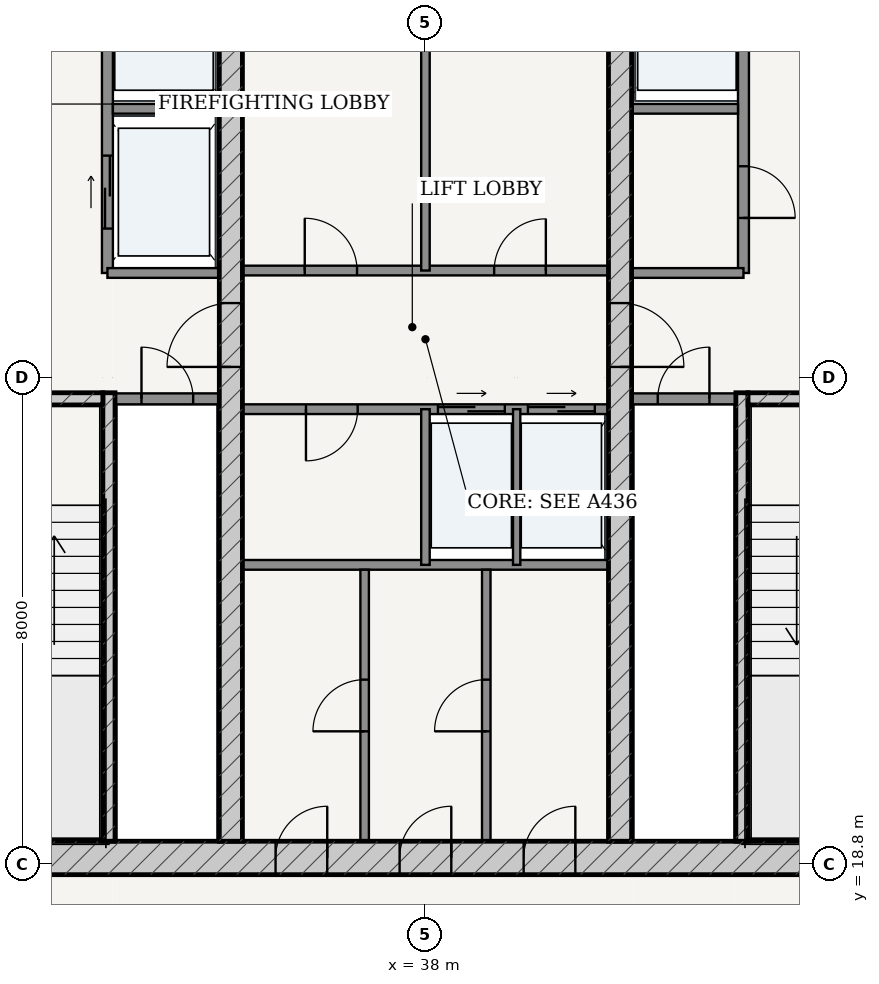
"""IFC4 building model, lengths in metres.
Left out: names, types, materials, properties, quantities, classifications, styles, units other than length and angle.
Written with IfcOpenShell. Run it as: python <this file> out.ifc"""

import sys

from ifc_helpers import new_model, si_unit, direction, frame, frame_2d, origin, place, context, subcontext, project, spatial, rectangle, extrude, source, transform, mapped, element, fill, save


model = new_model("IFC4")
c1 = context("Model", 3, precision=1e-05, world=origin(), true_north=direction((-0.2419218956, 0.970295726276)))
c2 = subcontext(c1, "Body", "Model", "MODEL_VIEW")
j1 = project(units=[si_unit("LENGTHUNIT", "METRE"), si_unit("PLANEANGLEUNIT", "RADIAN")], contexts=[c1])
p1 = place(None, origin())
s1 = spatial("IfcSite", under=j1, at=p1, CompositionType="ELEMENT")
p2 = place(p1, origin())
s2 = spatial("IfcBuilding", under=s1, at=p2, CompositionType="ELEMENT")
p3 = place(p2, frame((0.0, 0.0, 274.45)))
s3 = spatial("IfcBuildingStorey", under=s2, at=p3, CompositionType="ELEMENT", Elevation=274.45)
p4 = place(p3, frame((28.825, 18.9, 0.0), z_axis=(0.0, 0.0, 1.0), x_axis=(1.0, 0.0, 0.0)))
e1 = element("IfcWall", 1, at=p4, inside=s3, PredefinedType="SHEAR", context=c2, shape_type="SweptSolid", body=[
    extrude(rectangle(XDim=18.35, YDim=0.55, at=frame_2d((9.175, 0.0))), origin(), (0.0, 0.0, 1.0), 3.49),
])
p5 = place(p4, frame((6.71, 0.0, 0.0)))
e2 = element("IfcOpeningElement", 2, at=p5, cuts=e1, PredefinedType="OPENING", context=c2, shape_type="SweptSolid", body=[
    extrude(rectangle(XDim=0.85, YDim=2.1, at=frame_2d((0.425, 1.05))), frame((0.0, 0.285, 0.0), z_axis=(0.0, -1.0, 0.0), x_axis=(1.0, 0.0, 0.0)), (0.0, 0.0, 1.0), 0.57),
])
p6 = place(p4, frame((8.75, 0.0, 0.0)))
e3 = element("IfcOpeningElement", 3, at=p6, cuts=e1, PredefinedType="OPENING", context=c2, shape_type="SweptSolid", body=[
    extrude(rectangle(XDim=0.85, YDim=2.1, at=frame_2d((0.425, 1.05))), frame((0.0, 0.285, 0.0), z_axis=(0.0, -1.0, 0.0), x_axis=(1.0, 0.0, 0.0)), (0.0, 0.0, 1.0), 0.57),
])
p7 = place(p4, frame((10.79, 0.0, 0.0)))
e4 = element("IfcOpeningElement", 4, at=p7, cuts=e1, PredefinedType="OPENING", context=c2, shape_type="SweptSolid", body=[
    extrude(rectangle(XDim=0.85, YDim=2.1, at=frame_2d((0.425, 1.05))), frame((0.0, 0.285, 0.0), z_axis=(0.0, -1.0, 0.0), x_axis=(1.0, 0.0, 0.0)), (0.0, 0.0, 1.0), 0.57),
])
p8 = place(p3, frame((32.795, 19.175, 0.0), z_axis=(0.0, 0.0, 1.0), x_axis=(0.0, 1.0, 0.0)))
e5 = element("IfcWall", 5, at=p8, inside=s3, PredefinedType="SOLIDWALL", context=c2, shape_type="SweptSolid", body=[
    extrude(rectangle(XDim=7.375, YDim=0.2, at=frame_2d((3.688, 0.0))), origin(), (0.0, 0.0, 1.0), 3.49),
])
p9 = place(p3, frame((29.375, 26.45, 0.0), z_axis=(0.0, 0.0, 1.0), x_axis=(1.0, 0.0, 0.0)))
e6 = element("IfcWall", 6, at=p9, inside=s3, PredefinedType="SOLIDWALL", context=c2, shape_type="SweptSolid", body=[
    extrude(rectangle(XDim=3.32, YDim=0.2, at=frame_2d((1.66, 0.0))), origin(), (0.0, 0.0, 1.0), 3.49),
])
p10 = place(p9, frame((1.185, 0.0, 0.0)))
e7 = element("IfcOpeningElement", 7, at=p10, cuts=e6, PredefinedType="OPENING", context=c2, shape_type="SweptSolid", body=[
    extrude(rectangle(XDim=0.95, YDim=2.15, at=frame_2d((0.475, 1.075))), frame((0.0, 0.11, 0.0), z_axis=(0.0, -1.0, 0.0), x_axis=(1.0, 0.0, 0.0)), (0.0, 0.0, 1.0), 0.22),
])
p11 = place(p3, frame((43.205, 19.175, 0.0), z_axis=(0.0, 0.0, 1.0), x_axis=(0.0, 1.0, 0.0)))
e8 = element("IfcWall", 8, at=p11, inside=s3, PredefinedType="SOLIDWALL", context=c2, shape_type="SweptSolid", body=[
    extrude(rectangle(XDim=7.375, YDim=0.2, at=frame_2d((3.688, 0.0))), origin(), (0.0, 0.0, 1.0), 3.49),
])
p12 = place(p3, frame((43.305, 26.45, 0.0), z_axis=(0.0, 0.0, 1.0), x_axis=(1.0, 0.0, 0.0)))
e9 = element("IfcWall", 9, at=p12, inside=s3, PredefinedType="SOLIDWALL", context=c2, shape_type="SweptSolid", body=[
    extrude(rectangle(XDim=3.32, YDim=0.2, at=frame_2d((1.66, 0.0))), origin(), (0.0, 0.0, 1.0), 3.49),
])
p13 = place(p12, frame((1.185, 0.0, 0.0)))
e10 = element("IfcOpeningElement", 10, at=p13, cuts=e9, PredefinedType="OPENING", context=c2, shape_type="SweptSolid", body=[
    extrude(rectangle(XDim=0.95, YDim=2.15, at=frame_2d((0.475, 1.075))), frame((0.0, 0.11, 0.0), z_axis=(0.0, -1.0, 0.0), x_axis=(1.0, 0.0, 0.0)), (0.0, 0.0, 1.0), 0.22),
])
p14 = place(p3, frame((34.8, 19.175, 0.0), z_axis=(0.0, 0.0, 1.0), x_axis=(0.0, 1.0, 0.0)))
e11 = element("IfcWall", 11, at=p14, inside=s3, PredefinedType="SHEAR", context=c2, shape_type="SweptSolid", body=[
    extrude(rectangle(XDim=15.25, YDim=0.38, at=frame_2d((7.625, 0.0))), origin(), (0.0, 0.0, 1.0), 3.49),
])
p15 = place(p14, frame((7.8, 0.0, 0.0)))
e12 = element("IfcOpeningElement", 12, at=p15, cuts=e11, PredefinedType="OPENING", context=c2, shape_type="SweptSolid", body=[
    extrude(rectangle(XDim=1.05, YDim=2.15, at=frame_2d((0.525, 1.075))), frame((0.0, 0.2, 0.0), z_axis=(0.0, -1.0, 0.0), x_axis=(1.0, 0.0, 0.0)), (0.0, 0.0, 1.0), 0.4),
])
p16 = place(p3, frame((41.2, 19.175, 0.0), z_axis=(0.0, 0.0, 1.0), x_axis=(0.0, 1.0, 0.0)))
e13 = element("IfcWall", 13, at=p16, inside=s3, PredefinedType="SHEAR", context=c2, shape_type="SweptSolid", body=[
    extrude(rectangle(XDim=15.25, YDim=0.38, at=frame_2d((7.625, 0.0))), origin(), (0.0, 0.0, 1.0), 3.49),
])
p17 = place(p16, frame((7.8, 0.0, 0.0)))
e14 = element("IfcOpeningElement", 14, at=p17, cuts=e13, PredefinedType="OPENING", context=c2, shape_type="SweptSolid", body=[
    extrude(rectangle(XDim=1.05, YDim=2.15, at=frame_2d((0.525, 1.075))), frame((0.0, 0.2, 0.0), z_axis=(0.0, -1.0, 0.0), x_axis=(1.0, 0.0, 0.0)), (0.0, 0.0, 1.0), 0.4),
])
p18 = place(p3, frame((32.9, 26.45, 0.0), z_axis=(0.0, 0.0, 1.0), x_axis=(1.0, 0.0, 0.0)))
e15 = element("IfcWall", 15, at=p18, inside=s3, PredefinedType="PARTITIONING", context=c2, shape_type="SweptSolid", body=[
    extrude(rectangle(XDim=1.71, YDim=0.18, at=frame_2d((0.855, 0.0))), origin(), (0.0, 0.0, 1.0), 3.49),
])
p19 = place(p18, frame((0.43, 0.0, 0.0)))
e16 = element("IfcOpeningElement", 16, at=p19, cuts=e15, PredefinedType="OPENING", context=c2, shape_type="SweptSolid", body=[
    extrude(rectangle(XDim=0.85, YDim=2.1, at=frame_2d((0.425, 1.05))), frame((0.0, 0.1, 0.0), z_axis=(0.0, -1.0, 0.0), x_axis=(1.0, 0.0, 0.0)), (0.0, 0.0, 1.0), 0.2),
])
p20 = place(p3, frame((41.39, 26.45, 0.0), z_axis=(0.0, 0.0, 1.0), x_axis=(1.0, 0.0, 0.0)))
e17 = element("IfcWall", 17, at=p20, inside=s3, PredefinedType="PARTITIONING", context=c2, shape_type="SweptSolid", body=[
    extrude(rectangle(XDim=1.71, YDim=0.18, at=frame_2d((0.855, 0.0))), origin(), (0.0, 0.0, 1.0), 3.49),
])
p21 = place(p20, frame((0.43, 0.0, 0.0)))
e18 = element("IfcOpeningElement", 18, at=p21, cuts=e17, PredefinedType="OPENING", context=c2, shape_type="SweptSolid", body=[
    extrude(rectangle(XDim=0.85, YDim=2.1, at=frame_2d((0.425, 1.05))), frame((0.0, 0.1, 0.0), z_axis=(0.0, -1.0, 0.0), x_axis=(1.0, 0.0, 0.0)), (0.0, 0.0, 1.0), 0.2),
])
p22 = place(p3, frame((32.77, 28.52, 0.0), z_axis=(0.0, 0.0, 1.0), x_axis=(0.0, 1.0, 0.0)))
e19 = element("IfcWall", 19, at=p22, inside=s3, PredefinedType="PARTITIONING", context=c2, shape_type="SweptSolid", body=[
    extrude(rectangle(XDim=5.905, YDim=0.18, at=frame_2d((2.953, 0.0))), origin(), (0.0, 0.0, 1.0), 3.49),
])
p23 = place(p22, frame((3.655, 0.0, 0.0)))
e20 = element("IfcOpeningElement", 20, at=p23, cuts=e19, PredefinedType="OPENING", context=c2, shape_type="SweptSolid", body=[
    extrude(rectangle(XDim=1.15, YDim=2.2, at=frame_2d((0.575, 1.1))), frame((0.0, 0.1, 0.0), z_axis=(0.0, -1.0, 0.0), x_axis=(1.0, 0.0, 0.0)), (0.0, 0.0, 1.0), 0.2),
])
p24 = place(p22, frame((0.73, 0.0, 0.0)))
e21 = element("IfcOpeningElement", 21, at=p24, cuts=e19, PredefinedType="OPENING", context=c2, shape_type="SweptSolid", body=[
    extrude(rectangle(XDim=1.2, YDim=2.25, at=frame_2d((0.6, 1.125))), frame((0.0, 0.1, 0.0), z_axis=(0.0, -1.0, 0.0), x_axis=(1.0, 0.0, 0.0)), (0.0, 0.0, 1.0), 0.2),
])
p25 = place(p3, frame((32.86, 31.22, 0.0), z_axis=(0.0, 0.0, 1.0), x_axis=(1.0, 0.0, 0.0)))
e22 = element("IfcWall", 22, at=p25, inside=s3, PredefinedType="PARTITIONING", context=c2, shape_type="SweptSolid", body=[
    extrude(rectangle(XDim=1.75, YDim=0.16, at=frame_2d((0.875, 0.0))), origin(), (0.0, 0.0, 1.0), 3.49),
])
p26 = place(p3, frame((32.77, 28.52, 0.0), z_axis=(0.0, 0.0, 1.0), x_axis=(1.0, 0.0, 0.0)))
e23 = element("IfcWall", 23, at=p26, inside=s3, PredefinedType="PARTITIONING", context=c2, shape_type="SweptSolid", body=[
    extrude(rectangle(XDim=1.84, YDim=0.16, at=frame_2d((0.92, 0.0))), origin(), (0.0, 0.0, 1.0), 3.49),
])
p27 = place(p3, frame((43.23, 28.52, 0.0), z_axis=(0.0, 0.0, 1.0), x_axis=(0.0, 1.0, 0.0)))
e24 = element("IfcWall", 24, at=p27, inside=s3, PredefinedType="PARTITIONING", context=c2, shape_type="SweptSolid", body=[
    extrude(rectangle(XDim=5.905, YDim=0.18, at=frame_2d((2.953, 0.0))), origin(), (0.0, 0.0, 1.0), 3.49),
])
p28 = place(p27, frame((0.905, 0.0, 0.0)))
e25 = element("IfcOpeningElement", 25, at=p28, cuts=e24, PredefinedType="OPENING", context=c2, shape_type="SweptSolid", body=[
    extrude(rectangle(XDim=0.85, YDim=2.1, at=frame_2d((0.425, 1.05))), frame((0.0, 0.1, 0.0), z_axis=(0.0, -1.0, 0.0), x_axis=(1.0, 0.0, 0.0)), (0.0, 0.0, 1.0), 0.2),
])
p29 = place(p27, frame((3.655, 0.0, 0.0)))
e26 = element("IfcOpeningElement", 26, at=p29, cuts=e24, PredefinedType="OPENING", context=c2, shape_type="SweptSolid", body=[
    extrude(rectangle(XDim=1.15, YDim=2.2, at=frame_2d((0.575, 1.1))), frame((0.0, 0.1, 0.0), z_axis=(0.0, -1.0, 0.0), x_axis=(1.0, 0.0, 0.0)), (0.0, 0.0, 1.0), 0.2),
])
p30 = place(p3, frame((41.39, 31.22, 0.0), z_axis=(0.0, 0.0, 1.0), x_axis=(1.0, 0.0, 0.0)))
e27 = element("IfcWall", 27, at=p30, inside=s3, PredefinedType="PARTITIONING", context=c2, shape_type="SweptSolid", body=[
    extrude(rectangle(XDim=1.75, YDim=0.16, at=frame_2d((0.875, 0.0))), origin(), (0.0, 0.0, 1.0), 3.49),
])
p31 = place(p3, frame((41.39, 28.52, 0.0), z_axis=(0.0, 0.0, 1.0), x_axis=(1.0, 0.0, 0.0)))
e28 = element("IfcWall", 28, at=p31, inside=s3, PredefinedType="PARTITIONING", context=c2, shape_type="SweptSolid", body=[
    extrude(rectangle(XDim=1.84, YDim=0.16, at=frame_2d((0.92, 0.0))), origin(), (0.0, 0.0, 1.0), 3.49),
])
p32 = place(p3, frame((34.99, 28.56, 0.0), z_axis=(0.0, 0.0, 1.0), x_axis=(1.0, 0.0, 0.0)))
e29 = element("IfcWall", 29, at=p32, inside=s3, PredefinedType="PARTITIONING", context=c2, shape_type="SweptSolid", body=[
    extrude(rectangle(XDim=6.02, YDim=0.16, at=frame_2d((3.01, 0.0))), origin(), (0.0, 0.0, 1.0), 3.49),
])
p33 = place(p32, frame((1.025, 0.0, 0.0)))
e30 = element("IfcOpeningElement", 30, at=p33, cuts=e29, PredefinedType="OPENING", context=c2, shape_type="SweptSolid", body=[
    extrude(rectangle(XDim=0.86, YDim=2.1, at=frame_2d((0.43, 1.05))), frame((0.0, 0.09, 0.0), z_axis=(0.0, -1.0, 0.0), x_axis=(1.0, 0.0, 0.0)), (0.0, 0.0, 1.0), 0.18),
])
p34 = place(p32, frame((4.14, 0.0, 0.0)))
e31 = element("IfcOpeningElement", 31, at=p34, cuts=e29, PredefinedType="OPENING", context=c2, shape_type="SweptSolid", body=[
    extrude(rectangle(XDim=0.85, YDim=2.1, at=frame_2d((0.425, 1.05))), frame((0.0, 0.09, 0.0), z_axis=(0.0, -1.0, 0.0), x_axis=(1.0, 0.0, 0.0)), (0.0, 0.0, 1.0), 0.18),
])
p35 = place(p3, frame((38.0, 28.56, 0.0), z_axis=(0.0, 0.0, 1.0), x_axis=(0.0, 1.0, 0.0)))
e32 = element("IfcWall", 32, at=p35, inside=s3, PredefinedType="PARTITIONING", context=c2, shape_type="SweptSolid", body=[
    extrude(rectangle(XDim=5.865, YDim=0.14, at=frame_2d((2.933, 0.0))), origin(), (0.0, 0.0, 1.0), 3.49),
])
p36 = place(p3, frame((34.99, 26.28, 0.0), z_axis=(0.0, 0.0, 1.0), x_axis=(1.0, 0.0, 0.0)))
e33 = element("IfcWall", 33, at=p36, inside=s3, PredefinedType="PARTITIONING", context=c2, shape_type="SweptSolid", body=[
    extrude(rectangle(XDim=6.02, YDim=0.16, at=frame_2d((3.01, 0.0))), origin(), (0.0, 0.0, 1.0), 3.49),
])
p37 = place(p36, frame((1.045, 0.0, 0.0)))
e34 = element("IfcOpeningElement", 34, at=p37, cuts=e33, PredefinedType="OPENING", context=c2, shape_type="SweptSolid", body=[
    extrude(rectangle(XDim=0.85, YDim=2.1, at=frame_2d((0.425, 1.05))), frame((0.0, 0.09, 0.0), z_axis=(0.0, -1.0, 0.0), x_axis=(1.0, 0.0, 0.0)), (0.0, 0.0, 1.0), 0.18),
])
p38 = place(p36, frame((3.215, 0.0, 0.0)))
e35 = element("IfcOpeningElement", 35, at=p38, cuts=e33, PredefinedType="OPENING", context=c2, shape_type="SweptSolid", body=[
    extrude(rectangle(XDim=1.1, YDim=2.2, at=frame_2d((0.55, 1.1))), frame((0.0, 0.09, 0.0), z_axis=(0.0, -1.0, 0.0), x_axis=(1.0, 0.0, 0.0)), (0.0, 0.0, 1.0), 0.18),
])
p39 = place(p36, frame((4.695, 0.0, 0.0)))
e36 = element("IfcOpeningElement", 36, at=p39, cuts=e33, PredefinedType="OPENING", context=c2, shape_type="SweptSolid", body=[
    extrude(rectangle(XDim=1.1, YDim=2.2, at=frame_2d((0.55, 1.1))), frame((0.0, 0.09, 0.0), z_axis=(0.0, -1.0, 0.0), x_axis=(1.0, 0.0, 0.0)), (0.0, 0.0, 1.0), 0.18),
])
p40 = place(p3, frame((34.99, 23.72, 0.0), z_axis=(0.0, 0.0, 1.0), x_axis=(1.0, 0.0, 0.0)))
e37 = element("IfcWall", 37, at=p40, inside=s3, PredefinedType="PARTITIONING", context=c2, shape_type="SweptSolid", body=[
    extrude(rectangle(XDim=6.02, YDim=0.16, at=frame_2d((3.01, 0.0))), origin(), (0.0, 0.0, 1.0), 3.49),
])
p41 = place(p3, frame((38.0, 23.72, 0.0), z_axis=(0.0, 0.0, 1.0), x_axis=(0.0, 1.0, 0.0)))
e38 = element("IfcWall", 38, at=p41, inside=s3, PredefinedType="PARTITIONING", context=c2, shape_type="SweptSolid", body=[
    extrude(rectangle(XDim=2.56, YDim=0.14, at=frame_2d((1.28, 0.0))), origin(), (0.0, 0.0, 1.0), 3.49),
])
p42 = place(p3, frame((39.5, 23.72, 0.0), z_axis=(0.0, 0.0, 1.0), x_axis=(0.0, 1.0, 0.0)))
e39 = element("IfcWall", 39, at=p42, inside=s3, PredefinedType="PARTITIONING", context=c2, shape_type="SweptSolid", body=[
    extrude(rectangle(XDim=2.56, YDim=0.12, at=frame_2d((1.28, 0.0))), origin(), (0.0, 0.0, 1.0), 3.49),
])
p43 = place(p3, frame((37.0, 19.175, 0.0), z_axis=(0.0, 0.0, 1.0), x_axis=(0.0, 1.0, 0.0)))
e40 = element("IfcWall", 40, at=p43, inside=s3, PredefinedType="PARTITIONING", context=c2, shape_type="SweptSolid", body=[
    extrude(rectangle(XDim=4.465, YDim=0.14, at=frame_2d((2.232, 0.0))), origin(), (0.0, 0.0, 1.0), 3.49),
])
p44 = place(p43, frame((1.808, 0.0, 0.0)))
e41 = element("IfcOpeningElement", 41, at=p44, cuts=e40, PredefinedType="OPENING", context=c2, shape_type="SweptSolid", body=[
    extrude(rectangle(XDim=0.85, YDim=2.1, at=frame_2d((0.425, 1.05))), frame((0.0, 0.08, 0.0), z_axis=(0.0, -1.0, 0.0), x_axis=(1.0, 0.0, 0.0)), (0.0, 0.0, 1.0), 0.16),
])
p45 = place(p3, frame((39.0, 19.175, 0.0), z_axis=(0.0, 0.0, 1.0), x_axis=(0.0, 1.0, 0.0)))
e42 = element("IfcWall", 42, at=p45, inside=s3, PredefinedType="PARTITIONING", context=c2, shape_type="SweptSolid", body=[
    extrude(rectangle(XDim=4.465, YDim=0.14, at=frame_2d((2.232, 0.0))), origin(), (0.0, 0.0, 1.0), 3.49),
])
p46 = place(p45, frame((1.808, 0.0, 0.0)))
e43 = element("IfcOpeningElement", 43, at=p46, cuts=e42, PredefinedType="OPENING", context=c2, shape_type="SweptSolid", body=[
    extrude(rectangle(XDim=0.85, YDim=2.1, at=frame_2d((0.425, 1.05))), frame((0.0, 0.08, 0.0), z_axis=(0.0, -1.0, 0.0), x_axis=(1.0, 0.0, 0.0)), (0.0, 0.0, 1.0), 0.16),
])
m1 = source(origin(), c2, "Body", "SweptSolid", [
    extrude(rectangle(XDim=1.05, YDim=2.15, at=frame_2d((0.525, 1.075))), frame((0.0, 0.025, 0.0), z_axis=(0.0, -1.0, 0.0), x_axis=(1.0, 0.0, 0.0)), (0.0, 0.0, 1.0), 0.05),
])
p47 = place(p15, origin())
e44 = element("IfcDoor", 44, at=p47, inside=s3, OperationType="SINGLE_SWING_LEFT", PredefinedType="DOOR", context=c2, shape_type="MappedRepresentation", body=[
    mapped(m1, transform((0.0, 0.0, 0.0), scale=1.0)),
])
fill(e12, e44)
p48 = place(p17, frame((1.05, 0.0, 0.0), z_axis=(0.0, 0.0, 1.0), x_axis=(-1.0, 0.0, 0.0)))
e45 = element("IfcDoor", 45, at=p48, inside=s3, OperationType="SINGLE_SWING_RIGHT", PredefinedType="DOOR", context=c2, shape_type="MappedRepresentation", body=[
    mapped(m1, transform((0.0, 0.0, 0.0), scale=1.0)),
])
fill(e14, e45)
m2 = source(origin(), c2, "Body", "SweptSolid", [
    extrude(rectangle(XDim=0.85, YDim=2.1, at=frame_2d((0.425, 1.05))), frame((0.0, 0.025, 0.0), z_axis=(0.0, -1.0, 0.0), x_axis=(1.0, 0.0, 0.0)), (0.0, 0.0, 1.0), 0.05),
])
p49 = place(p19, origin())
e46 = element("IfcDoor", 46, at=p49, inside=s3, OperationType="SINGLE_SWING_LEFT", PredefinedType="DOOR", context=c2, shape_type="MappedRepresentation", body=[
    mapped(m2, transform((0.0, 0.0, 0.0), scale=1.0)),
])
fill(e16, e46)
p50 = place(p21, origin())
e47 = element("IfcDoor", 47, at=p50, inside=s3, OperationType="SINGLE_SWING_RIGHT", PredefinedType="DOOR", context=c2, shape_type="MappedRepresentation", body=[
    mapped(m2, transform((0.0, 0.0, 0.0), scale=1.0)),
])
fill(e18, e47)
p51 = place(p28, frame((0.85, 0.0, 0.0), z_axis=(0.0, 0.0, 1.0), x_axis=(-1.0, 0.0, 0.0)))
e48 = element("IfcDoor", 48, at=p51, inside=s3, OperationType="SINGLE_SWING_RIGHT", PredefinedType="DOOR", context=c2, shape_type="MappedRepresentation", body=[
    mapped(m2, transform((0.0, 0.0, 0.0), scale=1.0)),
])
fill(e25, e48)
m3 = source(origin(), c2, "Body", "SweptSolid", [
    extrude(rectangle(XDim=0.86, YDim=2.1, at=frame_2d((0.43, 1.05))), frame((0.0, 0.025, 0.0), z_axis=(0.0, -1.0, 0.0), x_axis=(1.0, 0.0, 0.0)), (0.0, 0.0, 1.0), 0.05),
])
p52 = place(p33, origin())
e49 = element("IfcDoor", 49, at=p52, inside=s3, OperationType="SINGLE_SWING_LEFT", PredefinedType="DOOR", context=c2, shape_type="MappedRepresentation", body=[
    mapped(m3, transform((0.0, 0.0, 0.0), scale=1.0)),
])
fill(e30, e49)
p53 = place(p34, origin())
e50 = element("IfcDoor", 50, at=p53, inside=s3, OperationType="SINGLE_SWING_RIGHT", PredefinedType="DOOR", context=c2, shape_type="MappedRepresentation", body=[
    mapped(m2, transform((0.0, 0.0, 0.0), scale=1.0)),
])
fill(e31, e50)
p54 = place(p37, frame((0.85, 0.0, 0.0), z_axis=(0.0, 0.0, 1.0), x_axis=(-1.0, 0.0, 0.0)))
e51 = element("IfcDoor", 51, at=p54, inside=s3, OperationType="SINGLE_SWING_RIGHT", PredefinedType="DOOR", context=c2, shape_type="MappedRepresentation", body=[
    mapped(m2, transform((0.0, 0.0, 0.0), scale=1.0)),
])
fill(e34, e51)
p55 = place(p5, origin())
e52 = element("IfcDoor", 52, at=p55, inside=s3, OperationType="SINGLE_SWING_RIGHT", PredefinedType="DOOR", context=c2, shape_type="MappedRepresentation", body=[
    mapped(m2, transform((0.0, 0.0, 0.0), scale=1.0)),
])
fill(e2, e52)
p56 = place(p6, origin())
e53 = element("IfcDoor", 53, at=p56, inside=s3, OperationType="SINGLE_SWING_RIGHT", PredefinedType="DOOR", context=c2, shape_type="MappedRepresentation", body=[
    mapped(m2, transform((0.0, 0.0, 0.0), scale=1.0)),
])
fill(e3, e53)
p57 = place(p7, origin())
e54 = element("IfcDoor", 54, at=p57, inside=s3, OperationType="SINGLE_SWING_RIGHT", PredefinedType="DOOR", context=c2, shape_type="MappedRepresentation", body=[
    mapped(m2, transform((0.0, 0.0, 0.0), scale=1.0)),
])
fill(e4, e54)
p58 = place(p44, origin())
e55 = element("IfcDoor", 55, at=p58, inside=s3, OperationType="SINGLE_SWING_LEFT", PredefinedType="DOOR", context=c2, shape_type="MappedRepresentation", body=[
    mapped(m2, transform((0.0, 0.0, 0.0), scale=1.0)),
])
fill(e41, e55)
p59 = place(p46, origin())
e56 = element("IfcDoor", 56, at=p59, inside=s3, OperationType="SINGLE_SWING_LEFT", PredefinedType="DOOR", context=c2, shape_type="MappedRepresentation", body=[
    mapped(m2, transform((0.0, 0.0, 0.0), scale=1.0)),
])
fill(e43, e56)
m4 = source(origin(), c2, "Body", "SweptSolid", [
    extrude(rectangle(XDim=1.2, YDim=2.25, at=frame_2d((0.6, 1.125))), frame((0.0, 0.025, 0.0), z_axis=(0.0, -1.0, 0.0), x_axis=(1.0, 0.0, 0.0)), (0.0, 0.0, 1.0), 0.05),
])
p60 = place(p24, origin())
e57 = element("IfcDoor", 57, at=p60, inside=s3, OperationType="DOUBLE_DOOR_SLIDING", PredefinedType="DOOR", context=c2, shape_type="MappedRepresentation", body=[
    mapped(m4, transform((0.0, 0.0, 0.0), scale=1.0)),
])
fill(e21, e57)
m5 = source(origin(), c2, "Body", "SweptSolid", [
    extrude(rectangle(XDim=1.1, YDim=2.2, at=frame_2d((0.55, 1.1))), frame((0.0, 0.025, 0.0), z_axis=(0.0, -1.0, 0.0), x_axis=(1.0, 0.0, 0.0)), (0.0, 0.0, 1.0), 0.05),
])
p61 = place(p38, origin())
e58 = element("IfcDoor", 58, at=p61, inside=s3, OperationType="DOUBLE_DOOR_SLIDING", PredefinedType="DOOR", context=c2, shape_type="MappedRepresentation", body=[
    mapped(m5, transform((0.0, 0.0, 0.0), scale=1.0)),
])
fill(e35, e58)
p62 = place(p39, origin())
e59 = element("IfcDoor", 59, at=p62, inside=s3, OperationType="DOUBLE_DOOR_SLIDING", PredefinedType="DOOR", context=c2, shape_type="MappedRepresentation", body=[
    mapped(m5, transform((0.0, 0.0, 0.0), scale=1.0)),
])
fill(e36, e59)
save(model, sys.argv[1])
